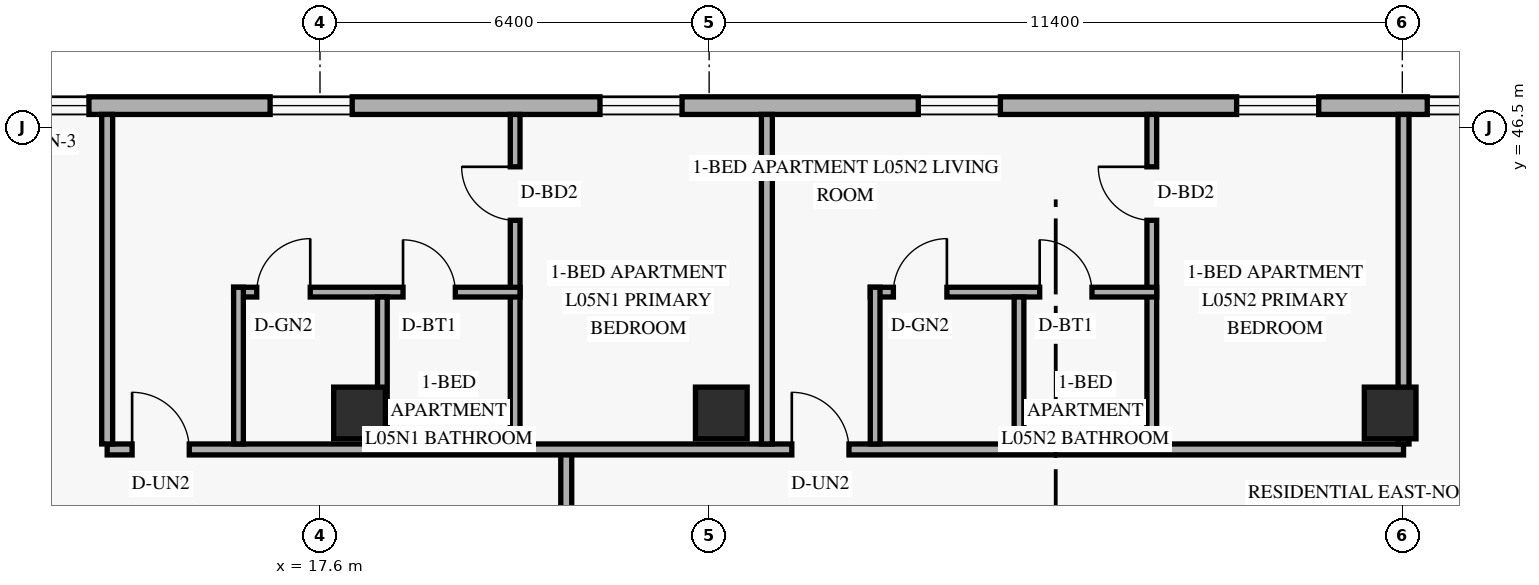
"""IFC4 building model, lengths in metres.
Left out: names, types, materials, properties, quantities, classifications, styles, units other than length and angle.
Written with IfcOpenShell. Run it as: python <this file> out.ifc"""

import sys

from ifc_helpers import new_model, si_unit, direction, frame, frame_2d, origin, origin_2d, place, context, subcontext, project, spatial, rectangle, extrude, element, fill, save


model = new_model("IFC4")
c1 = context("Model", 3, precision=1e-05, world=origin(), true_north=direction((0.0, 1.0)))
c2 = subcontext(c1, "Body", "Model", "MODEL_VIEW")
j1 = project(units=[si_unit("LENGTHUNIT", "METRE"), si_unit("PLANEANGLEUNIT", "RADIAN")], contexts=[c1])
p1 = place(None, origin())
s1 = spatial("IfcSite", under=j1, at=p1, CompositionType="ELEMENT")
p2 = place(p1, origin())
s2 = spatial("IfcBuilding", under=s1, at=p2, CompositionType="ELEMENT")
p3 = place(p2, frame((0.0, 0.0, 24.0)))
s3 = spatial("IfcBuildingStorey", under=s2, at=p3, CompositionType="ELEMENT", Elevation=24.0)
for number, where, z_axis, x_axis in (
    (1, (18.25, 41.8, 0.0), (0.0, 0.0, 1.0), (1.0, 0.0, 0.0)),
    (2, (24.2, 41.8, 0.0), (0.0, 0.0, 1.0), (1.0, 0.0, 0.0)),
    (3, (35.2, 41.8, 0.0), (0.0, 0.0, 1.0), (1.0, 0.0, 0.0)),
):
    element("IfcColumn", number, at=place(p3, frame(where, z_axis=z_axis, x_axis=x_axis)), inside=s3, PredefinedType="COLUMN", context=c2, shape_type="SweptSolid", body=[
        extrude(rectangle(XDim=0.85, YDim=0.85, at=origin_2d()), origin(), (0.0, 0.0, 1.0), 3.6),
    ])
p4 = place(p3, frame((44.98, 46.855, 0.0), z_axis=(0.0, 0.0, 1.0), x_axis=(-1.0, 0.0, 0.0)))
e4 = element("IfcWall", 4, at=p4, inside=s3, PredefinedType="SOLIDWALL", context=c2, shape_type="SweptSolid", body=[
    extrude(rectangle(XDim=39.56, YDim=0.29, at=frame_2d((19.78, 0.0))), origin(), (0.0, 0.0, 1.0), 3.36),
])
p5 = place(p4, frame((35.445, 0.0, 0.85)))
e5 = element("IfcOpeningElement", 5, at=p5, cuts=e4, PredefinedType="OPENING", context=c2, shape_type="SweptSolid", body=[
    extrude(rectangle(XDim=1.35, YDim=1.55, at=frame_2d((0.675, 0.775))), frame((0.0, 0.155, 0.0), z_axis=(0.0, -1.0, 0.0), x_axis=(1.0, 0.0, 0.0)), (0.0, 0.0, 1.0), 0.31),
])
p6 = place(p4, frame((31.18, 0.0, 0.85)))
e6 = element("IfcOpeningElement", 6, at=p6, cuts=e4, PredefinedType="OPENING", context=c2, shape_type="SweptSolid", body=[
    extrude(rectangle(XDim=1.2, YDim=1.5, at=frame_2d((0.6, 0.75))), frame((0.0, 0.155, 0.0), z_axis=(0.0, -1.0, 0.0), x_axis=(1.0, 0.0, 0.0)), (0.0, 0.0, 1.0), 0.31),
])
p7 = place(p4, frame((26.85, 0.0, 0.85)))
e7 = element("IfcOpeningElement", 7, at=p7, cuts=e4, PredefinedType="OPENING", context=c2, shape_type="SweptSolid", body=[
    extrude(rectangle(XDim=1.35, YDim=1.55, at=frame_2d((0.675, 0.775))), frame((0.0, 0.155, 0.0), z_axis=(0.0, -1.0, 0.0), x_axis=(1.0, 0.0, 0.0)), (0.0, 0.0, 1.0), 0.31),
])
p8 = place(p4, frame((21.425, 0.0, 0.85)))
e8 = element("IfcOpeningElement", 8, at=p8, cuts=e4, PredefinedType="OPENING", context=c2, shape_type="SweptSolid", body=[
    extrude(rectangle(XDim=1.35, YDim=1.55, at=frame_2d((0.675, 0.775))), frame((0.0, 0.155, 0.0), z_axis=(0.0, -1.0, 0.0), x_axis=(1.0, 0.0, 0.0)), (0.0, 0.0, 1.0), 0.31),
])
p9 = place(p4, frame((16.19, 0.0, 0.85)))
e9 = element("IfcOpeningElement", 9, at=p9, cuts=e4, PredefinedType="OPENING", context=c2, shape_type="SweptSolid", body=[
    extrude(rectangle(XDim=1.35, YDim=1.55, at=frame_2d((0.675, 0.775))), frame((0.0, 0.155, 0.0), z_axis=(0.0, -1.0, 0.0), x_axis=(1.0, 0.0, 0.0)), (0.0, 0.0, 1.0), 0.31),
])
p10 = place(p4, frame((10.955, 0.0, 0.85)))
e10 = element("IfcOpeningElement", 10, at=p10, cuts=e4, PredefinedType="OPENING", context=c2, shape_type="SweptSolid", body=[
    extrude(rectangle(XDim=1.35, YDim=1.55, at=frame_2d((0.675, 0.775))), frame((0.0, 0.155, 0.0), z_axis=(0.0, -1.0, 0.0), x_axis=(1.0, 0.0, 0.0)), (0.0, 0.0, 1.0), 0.31),
])
p11 = place(p4, frame((7.82, 0.0, 0.85)))
e11 = element("IfcOpeningElement", 11, at=p11, cuts=e4, PredefinedType="OPENING", context=c2, shape_type="SweptSolid", body=[
    extrude(rectangle(XDim=1.35, YDim=1.55, at=frame_2d((0.675, 0.775))), frame((0.0, 0.155, 0.0), z_axis=(0.0, -1.0, 0.0), x_axis=(1.0, 0.0, 0.0)), (0.0, 0.0, 1.0), 0.31),
])
p12 = place(p4, frame((3.04, 0.0, 0.85)))
e12 = element("IfcOpeningElement", 12, at=p12, cuts=e4, PredefinedType="OPENING", context=c2, shape_type="SweptSolid", body=[
    extrude(rectangle(XDim=1.35, YDim=1.55, at=frame_2d((0.675, 0.775))), frame((0.0, 0.155, 0.0), z_axis=(0.0, -1.0, 0.0), x_axis=(1.0, 0.0, 0.0)), (0.0, 0.0, 1.0), 0.31),
])
p13 = place(p3, frame((21.65, 6.8, 0.0), z_axis=(0.0, 0.0, 1.0), x_axis=(0.0, 1.0, 0.0)))
e13 = element("IfcWall", 13, at=p13, inside=s3, PredefinedType="STANDARD", context=c2, shape_type="SweptSolid", body=[
    extrude(rectangle(XDim=34.4, YDim=0.18, at=frame_2d((17.2, 0.0))), origin(), (0.0, 0.0, 1.0), 2.649),
])
p14 = place(p3, frame((14.1, 41.2, 0.0), z_axis=(0.0, 0.0, 1.0), x_axis=(1.0, 0.0, 0.0)))
e14 = element("IfcWall", 14, at=p14, inside=s3, PredefinedType="STANDARD", context=c2, shape_type="SweptSolid", body=[
    extrude(rectangle(XDim=21.32, YDim=0.18, at=frame_2d((10.66, 0.0))), origin(), (0.0, 0.0, 1.0), 2.649),
])
p15 = place(p14, frame((0.41, 0.0, 0.0)))
e15 = element("IfcOpeningElement", 15, at=p15, cuts=e14, PredefinedType="OPENING", context=c2, shape_type="SweptSolid", body=[
    extrude(rectangle(XDim=0.94, YDim=2.15, at=frame_2d((0.47, 1.075))), frame((0.0, 0.1, 0.0), z_axis=(0.0, -1.0, 0.0), x_axis=(1.0, 0.0, 0.0)), (0.0, 0.0, 1.0), 0.2),
])
p16 = place(p14, frame((11.26, 0.0, 0.0)))
e16 = element("IfcOpeningElement", 16, at=p16, cuts=e14, PredefinedType="OPENING", context=c2, shape_type="SweptSolid", body=[
    extrude(rectangle(XDim=0.94, YDim=2.15, at=frame_2d((0.47, 1.075))), frame((0.0, 0.1, 0.0), z_axis=(0.0, -1.0, 0.0), x_axis=(1.0, 0.0, 0.0)), (0.0, 0.0, 1.0), 0.2),
])
p17 = place(p3, frame((35.42, 41.29, 0.0), z_axis=(0.0, 0.0, 1.0), x_axis=(0.0, 1.0, 0.0)))
e17 = element("IfcWall", 17, at=p17, inside=s3, PredefinedType="PARTITIONING", context=c2, shape_type="SweptSolid", body=[
    extrude(rectangle(XDim=5.42, YDim=0.18, at=frame_2d((2.71, 0.0))), origin(), (0.0, 0.0, 1.0), 3.36),
])
for number, where, z_axis, x_axis in (
    (18, (14.1, 41.29, 0.0), (0.0, 0.0, 1.0), (0.0, 1.0, 0.0)),
    (19, (24.95, 41.29, 0.0), (0.0, 0.0, 1.0), (0.0, 1.0, 0.0)),
):
    element("IfcWall", number, at=place(p3, frame(where, z_axis=z_axis, x_axis=x_axis)), inside=s3, PredefinedType="PARTITIONING", context=c2, shape_type="SweptSolid", body=[
        extrude(rectangle(XDim=5.42, YDim=0.18, at=frame_2d((2.71, 0.0))), origin(), (0.0, 0.0, 1.0), 2.809),
    ])
p18 = place(p3, frame((20.81, 41.29, 0.0), z_axis=(0.0, 0.0, 1.0), x_axis=(0.0, 1.0, 0.0)))
e20 = element("IfcWall", 20, at=p18, inside=s3, PredefinedType="PARTITIONING", context=c2, shape_type="SweptSolid", body=[
    extrude(rectangle(XDim=5.42, YDim=0.16, at=frame_2d((2.71, 0.0))), origin(), (0.0, 0.0, 1.0), 2.809),
])
p19 = place(p18, frame((3.679, 0.0, 0.0)))
e21 = element("IfcOpeningElement", 21, at=p19, cuts=e20, PredefinedType="OPENING", context=c2, shape_type="SweptSolid", body=[
    extrude(rectangle(XDim=0.88, YDim=2.14, at=frame_2d((0.44, 1.07))), frame((0.0, 0.09, 0.0), z_axis=(0.0, -1.0, 0.0), x_axis=(1.0, 0.0, 0.0)), (0.0, 0.0, 1.0), 0.18),
])
p20 = place(p3, frame((16.18, 43.788, 0.0), z_axis=(0.0, 0.0, 1.0), x_axis=(1.0, 0.0, 0.0)))
e22 = element("IfcWall", 22, at=p20, inside=s3, PredefinedType="PLUMBINGWALL", context=c2, shape_type="SweptSolid", body=[
    extrude(rectangle(XDim=4.71, YDim=0.16, at=frame_2d((2.355, 0.0))), origin(), (0.0, 0.0, 1.0), 3.36),
])
p21 = place(p20, frame((0.38, 0.0, 0.0)))
e23 = element("IfcOpeningElement", 23, at=p21, cuts=e22, PredefinedType="OPENING", context=c2, shape_type="SweptSolid", body=[
    extrude(rectangle(XDim=0.88, YDim=2.12, at=frame_2d((0.44, 1.06))), frame((0.0, 0.09, 0.0), z_axis=(0.0, -1.0, 0.0), x_axis=(1.0, 0.0, 0.0)), (0.0, 0.0, 1.0), 0.18),
])
p22 = place(p20, frame((2.786, 0.0, 0.0)))
e24 = element("IfcOpeningElement", 24, at=p22, cuts=e22, PredefinedType="OPENING", context=c2, shape_type="SweptSolid", body=[
    extrude(rectangle(XDim=0.86, YDim=2.12, at=frame_2d((0.43, 1.06))), frame((0.0, 0.09, 0.0), z_axis=(0.0, -1.0, 0.0), x_axis=(1.0, 0.0, 0.0)), (0.0, 0.0, 1.0), 0.18),
])
p23 = place(p3, frame((16.26, 41.29, 0.0), z_axis=(0.0, 0.0, 1.0), x_axis=(0.0, 1.0, 0.0)))
e25 = element("IfcWall", 25, at=p23, inside=s3, PredefinedType="PLUMBINGWALL", context=c2, shape_type="SweptSolid", body=[
    extrude(rectangle(XDim=2.577, YDim=0.16, at=frame_2d((1.289, 0.0))), origin(), (0.0, 0.0, 1.0), 2.809),
])
p24 = place(p3, frame((18.625, 41.29, 0.0), z_axis=(0.0, 0.0, 1.0), x_axis=(0.0, 1.0, 0.0)))
e26 = element("IfcWall", 26, at=p24, inside=s3, PredefinedType="PLUMBINGWALL", context=c2, shape_type="SweptSolid", body=[
    extrude(rectangle(XDim=2.417, YDim=0.16, at=frame_2d((1.209, 0.0))), origin(), (0.0, 0.0, 1.0), 2.809),
])
p25 = place(p3, frame((31.28, 41.29, 0.0), z_axis=(0.0, 0.0, 1.0), x_axis=(0.0, 1.0, 0.0)))
e27 = element("IfcWall", 27, at=p25, inside=s3, PredefinedType="PARTITIONING", context=c2, shape_type="SweptSolid", body=[
    extrude(rectangle(XDim=5.42, YDim=0.16, at=frame_2d((2.71, 0.0))), origin(), (0.0, 0.0, 1.0), 2.809),
])
p26 = place(p25, frame((3.679, 0.0, 0.0)))
e28 = element("IfcOpeningElement", 28, at=p26, cuts=e27, PredefinedType="OPENING", context=c2, shape_type="SweptSolid", body=[
    extrude(rectangle(XDim=0.88, YDim=2.14, at=frame_2d((0.44, 1.07))), frame((0.0, 0.09, 0.0), z_axis=(0.0, -1.0, 0.0), x_axis=(1.0, 0.0, 0.0)), (0.0, 0.0, 1.0), 0.18),
])
p27 = place(p3, frame((26.65, 43.788, 0.0), z_axis=(0.0, 0.0, 1.0), x_axis=(1.0, 0.0, 0.0)))
e29 = element("IfcWall", 29, at=p27, inside=s3, PredefinedType="PLUMBINGWALL", context=c2, shape_type="SweptSolid", body=[
    extrude(rectangle(XDim=4.71, YDim=0.16, at=frame_2d((2.355, 0.0))), origin(), (0.0, 0.0, 1.0), 3.36),
])
p28 = place(p27, frame((0.38, 0.0, 0.0)))
e30 = element("IfcOpeningElement", 30, at=p28, cuts=e29, PredefinedType="OPENING", context=c2, shape_type="SweptSolid", body=[
    extrude(rectangle(XDim=0.88, YDim=2.12, at=frame_2d((0.44, 1.06))), frame((0.0, 0.09, 0.0), z_axis=(0.0, -1.0, 0.0), x_axis=(1.0, 0.0, 0.0)), (0.0, 0.0, 1.0), 0.18),
])
p29 = place(p27, frame((2.786, 0.0, 0.0)))
e31 = element("IfcOpeningElement", 31, at=p29, cuts=e29, PredefinedType="OPENING", context=c2, shape_type="SweptSolid", body=[
    extrude(rectangle(XDim=0.86, YDim=2.12, at=frame_2d((0.43, 1.06))), frame((0.0, 0.09, 0.0), z_axis=(0.0, -1.0, 0.0), x_axis=(1.0, 0.0, 0.0)), (0.0, 0.0, 1.0), 0.18),
])
p30 = place(p3, frame((26.73, 41.29, 0.0), z_axis=(0.0, 0.0, 1.0), x_axis=(0.0, 1.0, 0.0)))
e32 = element("IfcWall", 32, at=p30, inside=s3, PredefinedType="PLUMBINGWALL", context=c2, shape_type="SweptSolid", body=[
    extrude(rectangle(XDim=2.577, YDim=0.16, at=frame_2d((1.289, 0.0))), origin(), (0.0, 0.0, 1.0), 2.809),
])
p31 = place(p3, frame((29.096, 41.29, 0.0), z_axis=(0.0, 0.0, 1.0), x_axis=(0.0, 1.0, 0.0)))
e33 = element("IfcWall", 33, at=p31, inside=s3, PredefinedType="PLUMBINGWALL", context=c2, shape_type="SweptSolid", body=[
    extrude(rectangle(XDim=2.417, YDim=0.16, at=frame_2d((1.209, 0.0))), origin(), (0.0, 0.0, 1.0), 2.809),
])
p32 = place(p6, origin())
e34 = element("IfcWindow", 34, at=p32, inside=s3, PartitioningType="SINGLE_PANEL", PredefinedType="WINDOW", context=c2, shape_type="SweptSolid", body=[
    extrude(rectangle(XDim=1.2, YDim=1.5, at=frame_2d((0.6, 0.75))), frame((0.0, 0.03, 0.0), z_axis=(0.0, -1.0, 0.0), x_axis=(1.0, 0.0, 0.0)), (0.0, 0.0, 1.0), 0.06),
])
fill(e6, e34)
p33 = place(p7, origin())
e35 = element("IfcWindow", 35, at=p33, inside=s3, PartitioningType="SINGLE_PANEL", PredefinedType="WINDOW", context=c2, shape_type="SweptSolid", body=[
    extrude(rectangle(XDim=1.35, YDim=1.55, at=frame_2d((0.675, 0.775))), frame((0.0, 0.03, 0.0), z_axis=(0.0, -1.0, 0.0), x_axis=(1.0, 0.0, 0.0)), (0.0, 0.0, 1.0), 0.06),
])
fill(e7, e35)
p34 = place(p8, origin())
e36 = element("IfcWindow", 36, at=p34, inside=s3, PartitioningType="SINGLE_PANEL", PredefinedType="WINDOW", context=c2, shape_type="SweptSolid", body=[
    extrude(rectangle(XDim=1.35, YDim=1.55, at=frame_2d((0.675, 0.775))), frame((0.0, 0.03, 0.0), z_axis=(0.0, -1.0, 0.0), x_axis=(1.0, 0.0, 0.0)), (0.0, 0.0, 1.0), 0.06),
])
fill(e8, e36)
p35 = place(p9, origin())
e37 = element("IfcWindow", 37, at=p35, inside=s3, PartitioningType="SINGLE_PANEL", PredefinedType="WINDOW", context=c2, shape_type="SweptSolid", body=[
    extrude(rectangle(XDim=1.35, YDim=1.55, at=frame_2d((0.675, 0.775))), frame((0.0, 0.03, 0.0), z_axis=(0.0, -1.0, 0.0), x_axis=(1.0, 0.0, 0.0)), (0.0, 0.0, 1.0), 0.06),
])
fill(e9, e37)
p36 = place(p10, origin())
e38 = element("IfcWindow", 38, at=p36, inside=s3, PartitioningType="SINGLE_PANEL", PredefinedType="WINDOW", context=c2, shape_type="SweptSolid", body=[
    extrude(rectangle(XDim=1.35, YDim=1.55, at=frame_2d((0.675, 0.775))), frame((0.0, 0.03, 0.0), z_axis=(0.0, -1.0, 0.0), x_axis=(1.0, 0.0, 0.0)), (0.0, 0.0, 1.0), 0.06),
])
fill(e10, e38)
p37 = place(p11, origin())
e39 = element("IfcWindow", 39, at=p37, inside=s3, PartitioningType="SINGLE_PANEL", PredefinedType="WINDOW", context=c2, shape_type="SweptSolid", body=[
    extrude(rectangle(XDim=1.35, YDim=1.55, at=frame_2d((0.675, 0.775))), frame((0.0, 0.03, 0.0), z_axis=(0.0, -1.0, 0.0), x_axis=(1.0, 0.0, 0.0)), (0.0, 0.0, 1.0), 0.06),
])
fill(e11, e39)
p38 = place(p15, origin())
e40 = element("IfcDoor", 40, at=p38, inside=s3, OperationType="SINGLE_SWING_LEFT", PredefinedType="DOOR", context=c2, shape_type="SweptSolid", body=[
    extrude(rectangle(XDim=0.94, YDim=2.15, at=frame_2d((0.47, 1.075))), frame((0.0, 0.025, 0.0), z_axis=(0.0, -1.0, 0.0), x_axis=(1.0, 0.0, 0.0)), (0.0, 0.0, 1.0), 0.05),
])
fill(e15, e40)
p39 = place(p21, origin())
e41 = element("IfcDoor", 41, at=p39, inside=s3, OperationType="SINGLE_SWING_RIGHT", PredefinedType="DOOR", context=c2, shape_type="SweptSolid", body=[
    extrude(rectangle(XDim=0.88, YDim=2.12, at=frame_2d((0.44, 1.06))), frame((0.0, 0.025, 0.0), z_axis=(0.0, -1.0, 0.0), x_axis=(1.0, 0.0, 0.0)), (0.0, 0.0, 1.0), 0.05),
])
fill(e23, e41)
p40 = place(p22, origin())
e42 = element("IfcDoor", 42, at=p40, inside=s3, OperationType="SINGLE_SWING_LEFT", PredefinedType="DOOR", context=c2, shape_type="SweptSolid", body=[
    extrude(rectangle(XDim=0.86, YDim=2.12, at=frame_2d((0.43, 1.06))), frame((0.0, 0.025, 0.0), z_axis=(0.0, -1.0, 0.0), x_axis=(1.0, 0.0, 0.0)), (0.0, 0.0, 1.0), 0.05),
])
fill(e24, e42)
p41 = place(p19, origin())
e43 = element("IfcDoor", 43, at=p41, inside=s3, OperationType="SINGLE_SWING_RIGHT", PredefinedType="DOOR", context=c2, shape_type="SweptSolid", body=[
    extrude(rectangle(XDim=0.88, YDim=2.14, at=frame_2d((0.44, 1.07))), frame((0.0, 0.025, 0.0), z_axis=(0.0, -1.0, 0.0), x_axis=(1.0, 0.0, 0.0)), (0.0, 0.0, 1.0), 0.05),
])
fill(e21, e43)
p42 = place(p16, origin())
e44 = element("IfcDoor", 44, at=p42, inside=s3, OperationType="SINGLE_SWING_LEFT", PredefinedType="DOOR", context=c2, shape_type="SweptSolid", body=[
    extrude(rectangle(XDim=0.94, YDim=2.15, at=frame_2d((0.47, 1.075))), frame((0.0, 0.025, 0.0), z_axis=(0.0, -1.0, 0.0), x_axis=(1.0, 0.0, 0.0)), (0.0, 0.0, 1.0), 0.05),
])
fill(e16, e44)
p43 = place(p28, origin())
e45 = element("IfcDoor", 45, at=p43, inside=s3, OperationType="SINGLE_SWING_RIGHT", PredefinedType="DOOR", context=c2, shape_type="SweptSolid", body=[
    extrude(rectangle(XDim=0.88, YDim=2.12, at=frame_2d((0.44, 1.06))), frame((0.0, 0.025, 0.0), z_axis=(0.0, -1.0, 0.0), x_axis=(1.0, 0.0, 0.0)), (0.0, 0.0, 1.0), 0.05),
])
fill(e30, e45)
p44 = place(p29, origin())
e46 = element("IfcDoor", 46, at=p44, inside=s3, OperationType="SINGLE_SWING_LEFT", PredefinedType="DOOR", context=c2, shape_type="SweptSolid", body=[
    extrude(rectangle(XDim=0.86, YDim=2.12, at=frame_2d((0.43, 1.06))), frame((0.0, 0.025, 0.0), z_axis=(0.0, -1.0, 0.0), x_axis=(1.0, 0.0, 0.0)), (0.0, 0.0, 1.0), 0.05),
])
fill(e31, e46)
p45 = place(p26, origin())
e47 = element("IfcDoor", 47, at=p45, inside=s3, OperationType="SINGLE_SWING_RIGHT", PredefinedType="DOOR", context=c2, shape_type="SweptSolid", body=[
    extrude(rectangle(XDim=0.88, YDim=2.14, at=frame_2d((0.44, 1.07))), frame((0.0, 0.025, 0.0), z_axis=(0.0, -1.0, 0.0), x_axis=(1.0, 0.0, 0.0)), (0.0, 0.0, 1.0), 0.05),
])
fill(e28, e47)
save(model, sys.argv[1])
